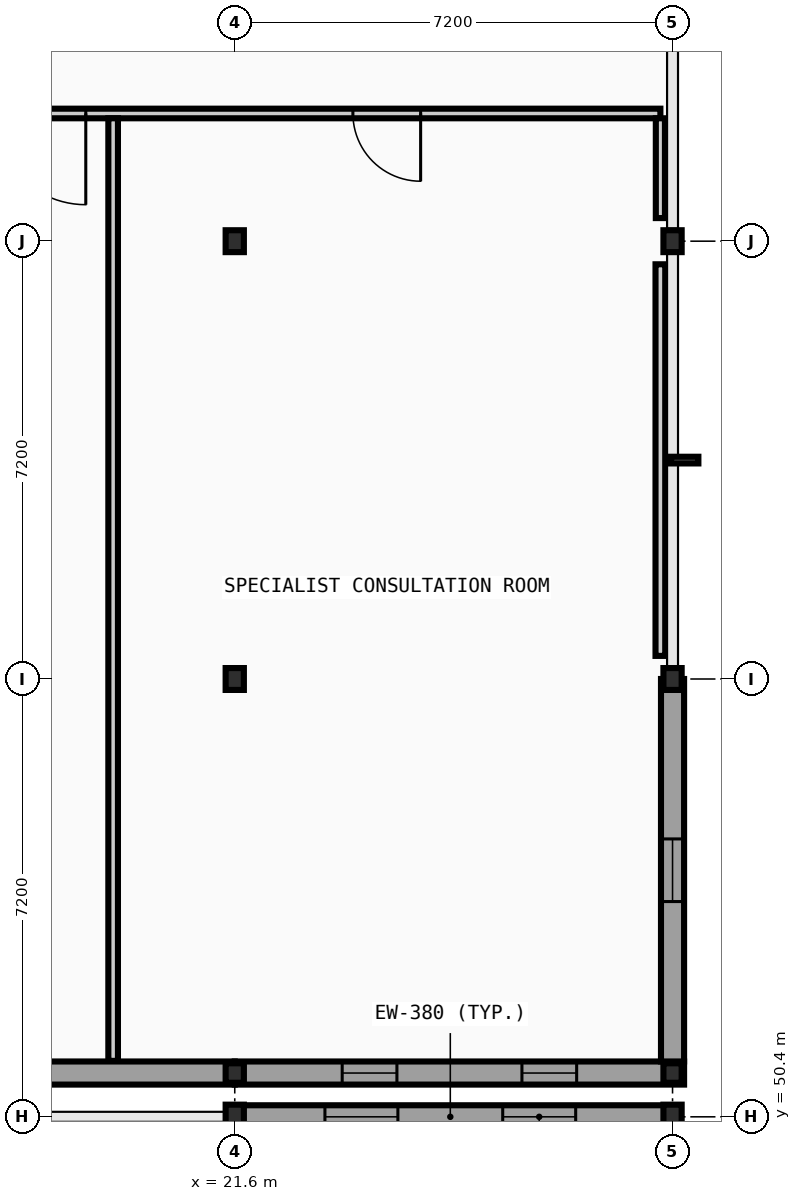
"""IFC4 building model, lengths in metres.
Left out: names, types, materials, properties, quantities, classifications, styles, units other than length and angle.
Written with IfcOpenShell. Run it as: python <this file> out.ifc"""

import sys

from ifc_helpers import new_model, si_unit, direction, frame, frame_2d, origin, origin_2d, place, context, subcontext, project, spatial, rectangle, i_section, extrude, element, fill, save


model = new_model("IFC4")
c1 = context("Model", 3, precision=1e-05, world=origin(), true_north=direction((0.0, 1.0)))
c2 = subcontext(c1, "Body", "Model", "MODEL_VIEW")
j1 = project(units=[si_unit("LENGTHUNIT", "METRE"), si_unit("PLANEANGLEUNIT", "RADIAN")], contexts=[c1])
p1 = place(None, origin())
s1 = spatial("IfcSite", under=j1, at=p1, CompositionType="ELEMENT")
p2 = place(p1, origin())
s2 = spatial("IfcBuilding", under=s1, at=p2, CompositionType="ELEMENT")
p3 = place(p2, frame((0.0, 0.0, 5.2)))
s3 = spatial("IfcBuildingStorey", under=s2, at=p3, CompositionType="ELEMENT", Elevation=5.2)
p4 = place(p3, frame((21.6, 50.4, 0.0), z_axis=(0.0, 0.0, 1.0), x_axis=(1.0, 0.0, 0.0)))
e1 = element("IfcColumn", 1, at=p4, inside=s3, PredefinedType="COLUMN", context=c2, shape_type="SweptSolid", body=[
    extrude(i_section(OverallWidth=0.3, OverallDepth=0.4, WebThickness=0.013, FlangeThickness=0.024, FilletRadius=0.027, at=origin_2d()), origin(), (0.0, 0.0, 1.0), 4.4),
])
p5 = place(p3, frame((21.6, 51.12, 0.0), z_axis=(0.0, 0.0, 1.0), x_axis=(1.0, 0.0, 0.0)))
e2 = element("IfcColumn", 2, at=p5, inside=s3, PredefinedType="COLUMN", context=c2, shape_type="SweptSolid", body=[
    extrude(i_section(OverallWidth=0.3, OverallDepth=0.32, WebThickness=0.011, FlangeThickness=0.021, FilletRadius=0.027, at=origin_2d()), origin(), (0.0, 0.0, 1.0), 4.4),
])
for number, where, z_axis, x_axis in (
    (3, (21.6, 57.6, 0.0), (0.0, 0.0, 1.0), (1.0, 0.0, 0.0)),
    (4, (21.6, 64.8, 0.0), (0.0, 0.0, 1.0), (1.0, 0.0, 0.0)),
):
    element("IfcColumn", number, at=place(p3, frame(where, z_axis=z_axis, x_axis=x_axis)), inside=s3, PredefinedType="COLUMN", context=c2, shape_type="SweptSolid", body=[
        extrude(i_section(OverallWidth=0.3, OverallDepth=0.36, WebThickness=0.012, FlangeThickness=0.022, FilletRadius=0.027, at=origin_2d()), origin(), (0.0, 0.0, 1.0), 4.4),
    ])
p6 = place(p3, frame((28.8, 50.4, 0.0), z_axis=(0.0, 0.0, 1.0), x_axis=(1.0, 0.0, 0.0)))
e5 = element("IfcColumn", 5, at=p6, inside=s3, PredefinedType="COLUMN", context=c2, shape_type="SweptSolid", body=[
    extrude(i_section(OverallWidth=0.3, OverallDepth=0.4, WebThickness=0.013, FlangeThickness=0.024, FilletRadius=0.027, at=origin_2d()), origin(), (0.0, 0.0, 1.0), 4.4),
])
p7 = place(p3, frame((28.8, 51.12, 0.0), z_axis=(0.0, 0.0, 1.0), x_axis=(1.0, 0.0, 0.0)))
e6 = element("IfcColumn", 6, at=p7, inside=s3, PredefinedType="COLUMN", context=c2, shape_type="SweptSolid", body=[
    extrude(i_section(OverallWidth=0.3, OverallDepth=0.32, WebThickness=0.011, FlangeThickness=0.021, FilletRadius=0.027, at=origin_2d()), origin(), (0.0, 0.0, 1.0), 4.4),
])
for number, where, z_axis, x_axis in (
    (7, (28.8, 57.6, 0.0), (0.0, 0.0, 1.0), (1.0, 0.0, 0.0)),
    (8, (28.8, 64.8, 0.0), (0.0, 0.0, 1.0), (1.0, 0.0, 0.0)),
):
    element("IfcColumn", number, at=place(p3, frame(where, z_axis=z_axis, x_axis=x_axis)), inside=s3, PredefinedType="COLUMN", context=c2, shape_type="SweptSolid", body=[
        extrude(i_section(OverallWidth=0.3, OverallDepth=0.36, WebThickness=0.012, FlangeThickness=0.022, FilletRadius=0.027, at=origin_2d()), origin(), (0.0, 0.0, 1.0), 4.4),
    ])
p8 = place(p3, frame((28.8, 50.4, 0.0), z_axis=(0.0, 0.0, 1.0), x_axis=(-1.0, 0.0, 0.0)))
e9 = element("IfcWall", 9, at=p8, inside=s3, PredefinedType="STANDARD", context=c2, shape_type="SweptSolid", body=[
    extrude(rectangle(XDim=7.31, YDim=0.38, at=frame_2d((3.655, 0.0))), origin(), (0.0, 0.0, 1.0), 3.88),
])
p9 = place(p8, frame((1.593, 0.0, 0.95)))
e10 = element("IfcOpeningElement", 10, at=p9, cuts=e9, PredefinedType="OPENING", context=c2, shape_type="SweptSolid", body=[
    extrude(rectangle(XDim=1.2, YDim=1.26, at=frame_2d((0.6, 0.63))), frame((0.0, 0.2, 0.0), z_axis=(0.0, -1.0, 0.0), x_axis=(1.0, 0.0, 0.0)), (0.0, 0.0, 1.0), 0.4),
])
p10 = place(p8, frame((4.517, 0.0, 0.95)))
e11 = element("IfcOpeningElement", 11, at=p10, cuts=e9, PredefinedType="OPENING", context=c2, shape_type="SweptSolid", body=[
    extrude(rectangle(XDim=1.2, YDim=1.26, at=frame_2d((0.6, 0.63))), frame((0.0, 0.2, 0.0), z_axis=(0.0, -1.0, 0.0), x_axis=(1.0, 0.0, 0.0)), (0.0, 0.0, 1.0), 0.4),
])
p11 = place(p3, frame((14.4, 51.12, 0.0), z_axis=(0.0, 0.0, 1.0), x_axis=(1.0, 0.0, 0.0)))
e12 = element("IfcWall", 12, at=p11, inside=s3, PredefinedType="STANDARD", context=c2, shape_type="SweptSolid", body=[
    extrude(rectangle(XDim=7.2, YDim=0.38, at=frame_2d((3.6, 0.0))), origin(), (0.0, 0.0, 1.0), 3.88),
])
p12 = place(p11, frame((1.56, 0.0, 0.9)))
e13 = element("IfcOpeningElement", 13, at=p12, cuts=e12, PredefinedType="OPENING", context=c2, shape_type="SweptSolid", body=[
    extrude(rectangle(XDim=1.2, YDim=1.8, at=frame_2d((0.6, 0.9))), frame((0.0, 0.2, 0.0), z_axis=(0.0, -1.0, 0.0), x_axis=(1.0, 0.0, 0.0)), (0.0, 0.0, 1.0), 0.4),
])
p13 = place(p3, frame((21.6, 51.12, 0.0), z_axis=(0.0, 0.0, 1.0), x_axis=(1.0, 0.0, 0.0)))
e14 = element("IfcWall", 14, at=p13, inside=s3, PredefinedType="STANDARD", context=c2, shape_type="SweptSolid", body=[
    extrude(rectangle(XDim=7.39, YDim=0.38, at=frame_2d((3.695, 0.0))), origin(), (0.0, 0.0, 1.0), 3.88),
])
p14 = place(p13, frame((1.767, 0.0, 1.1)))
e15 = element("IfcOpeningElement", 15, at=p14, cuts=e14, PredefinedType="OPENING", context=c2, shape_type="SweptSolid", body=[
    extrude(rectangle(XDim=0.9, YDim=1.6, at=frame_2d((0.45, 0.8))), frame((0.0, 0.2, 0.0), z_axis=(0.0, -1.0, 0.0), x_axis=(1.0, 0.0, 0.0)), (0.0, 0.0, 1.0), 0.4),
])
p15 = place(p13, frame((4.723, 0.0, 1.1)))
e16 = element("IfcOpeningElement", 16, at=p15, cuts=e14, PredefinedType="OPENING", context=c2, shape_type="SweptSolid", body=[
    extrude(rectangle(XDim=0.9, YDim=1.6, at=frame_2d((0.45, 0.8))), frame((0.0, 0.2, 0.0), z_axis=(0.0, -1.0, 0.0), x_axis=(1.0, 0.0, 0.0)), (0.0, 0.0, 1.0), 0.4),
])
p16 = place(p3, frame((28.8, 51.31, 0.0), z_axis=(0.0, 0.0, 1.0), x_axis=(0.0, 1.0, 0.0)))
e17 = element("IfcWall", 17, at=p16, inside=s3, PredefinedType="STANDARD", context=c2, shape_type="SweptSolid", body=[
    extrude(rectangle(XDim=6.29, YDim=0.38, at=frame_2d((3.145, 0.0))), origin(), (0.0, 0.0, 1.0), 3.81),
])
p17 = place(p16, frame((2.63, 0.0, 0.95)))
e18 = element("IfcOpeningElement", 18, at=p17, cuts=e17, PredefinedType="OPENING", context=c2, shape_type="SweptSolid", body=[
    extrude(rectangle(XDim=1.03, YDim=1.26, at=frame_2d((0.515, 0.63))), frame((0.0, 0.2, 0.0), z_axis=(0.0, -1.0, 0.0), x_axis=(1.0, 0.0, 0.0)), (0.0, 0.0, 1.0), 0.4),
])
p18 = place(p3, frame((14.7, 66.9, 0.0), z_axis=(0.0, 0.0, 1.0), x_axis=(1.0, 0.0, 0.0)))
e19 = element("IfcWall", 19, at=p18, inside=s3, PredefinedType="PARTITIONING", context=c2, shape_type="SweptSolid", body=[
    extrude(rectangle(XDim=13.9, YDim=0.158, at=frame_2d((6.95, 0.0))), origin(), (0.0, 0.0, 1.0), 4.185),
])
p19 = place(p18, frame((2.95, 0.0, 0.0)))
e20 = element("IfcOpeningElement", 20, at=p19, cuts=e19, PredefinedType="OPENING", context=c2, shape_type="SweptSolid", body=[
    extrude(rectangle(XDim=1.5, YDim=2.2, at=frame_2d((0.75, 1.1))), frame((0.0, 0.089, 0.0), z_axis=(0.0, -1.0, 0.0), x_axis=(1.0, 0.0, 0.0)), (0.0, 0.0, 1.0), 0.178),
])
p20 = place(p18, frame((8.843, 0.0, 0.0)))
e21 = element("IfcOpeningElement", 21, at=p20, cuts=e19, PredefinedType="OPENING", context=c2, shape_type="SweptSolid", body=[
    extrude(rectangle(XDim=1.114, YDim=2.124, at=frame_2d((0.557, 1.062))), frame((0.0, 0.089, 0.0), z_axis=(0.0, -1.0, 0.0), x_axis=(1.0, 0.0, 0.0)), (0.0, 0.0, 1.0), 0.178),
])
p21 = place(p3, frame((19.6, 51.32, 0.0), z_axis=(0.0, 0.0, 1.0), x_axis=(0.0, 1.0, 0.0)))
e22 = element("IfcWall", 22, at=p21, inside=s3, PredefinedType="PARTITIONING", context=c2, shape_type="SweptSolid", body=[
    extrude(rectangle(XDim=15.501, YDim=0.158, at=frame_2d((7.75, 0.0))), origin(), (0.0, 0.0, 1.0), 4.185),
])
p22 = place(p3, frame((28.6, 57.98, 0.0), z_axis=(0.0, 0.0, 1.0), x_axis=(0.0, 1.0, 0.0)))
e23 = element("IfcWall", 23, at=p22, inside=s3, PredefinedType="PARTITIONING", context=c2, shape_type="SweptSolid", body=[
    extrude(rectangle(XDim=6.44, YDim=0.16, at=frame_2d((3.22, 0.0))), origin(), (0.0, 0.0, 1.0), 3.81),
])
p23 = place(p3, frame((28.6, 65.18, 0.0), z_axis=(0.0, 0.0, 1.0), x_axis=(0.0, 1.0, 0.0)))
e24 = element("IfcWall", 24, at=p23, inside=s3, PredefinedType="PARTITIONING", context=c2, shape_type="SweptSolid", body=[
    extrude(rectangle(XDim=1.641, YDim=0.15, at=frame_2d((0.821, 0.0))), origin(), (0.0, 0.0, 1.0), 3.81),
])
p24 = place(p9, origin())
e25 = element("IfcWindow", 25, at=p24, inside=s3, PartitioningType="SINGLE_PANEL", PredefinedType="WINDOW", context=c2, shape_type="SweptSolid", body=[
    extrude(rectangle(XDim=1.2, YDim=1.26, at=frame_2d((0.6, 0.63))), frame((0.0, 0.03, 0.0), z_axis=(0.0, -1.0, 0.0), x_axis=(1.0, 0.0, 0.0)), (0.0, 0.0, 1.0), 0.06),
])
fill(e10, e25)
p25 = place(p10, origin())
e26 = element("IfcWindow", 26, at=p25, inside=s3, PartitioningType="SINGLE_PANEL", PredefinedType="WINDOW", context=c2, shape_type="SweptSolid", body=[
    extrude(rectangle(XDim=1.2, YDim=1.26, at=frame_2d((0.6, 0.63))), frame((0.0, 0.03, 0.0), z_axis=(0.0, -1.0, 0.0), x_axis=(1.0, 0.0, 0.0)), (0.0, 0.0, 1.0), 0.06),
])
fill(e11, e26)
p26 = place(p14, origin())
e27 = element("IfcWindow", 27, at=p26, inside=s3, PartitioningType="SINGLE_PANEL", PredefinedType="WINDOW", context=c2, shape_type="SweptSolid", body=[
    extrude(rectangle(XDim=0.9, YDim=1.6, at=frame_2d((0.45, 0.8))), frame((0.0, 0.03, 0.0), z_axis=(0.0, -1.0, 0.0), x_axis=(1.0, 0.0, 0.0)), (0.0, 0.0, 1.0), 0.06),
])
fill(e15, e27)
p27 = place(p15, origin())
e28 = element("IfcWindow", 28, at=p27, inside=s3, PartitioningType="SINGLE_PANEL", PredefinedType="WINDOW", context=c2, shape_type="SweptSolid", body=[
    extrude(rectangle(XDim=0.9, YDim=1.6, at=frame_2d((0.45, 0.8))), frame((0.0, 0.03, 0.0), z_axis=(0.0, -1.0, 0.0), x_axis=(1.0, 0.0, 0.0)), (0.0, 0.0, 1.0), 0.06),
])
fill(e16, e28)
p28 = place(p17, origin())
e29 = element("IfcWindow", 29, at=p28, inside=s3, PartitioningType="SINGLE_PANEL", PredefinedType="WINDOW", context=c2, shape_type="SweptSolid", body=[
    extrude(rectangle(XDim=1.03, YDim=1.26, at=frame_2d((0.515, 0.63))), frame((0.0, 0.03, 0.0), z_axis=(0.0, -1.0, 0.0), x_axis=(1.0, 0.0, 0.0)), (0.0, 0.0, 1.0), 0.06),
])
fill(e18, e29)
p29 = place(p19, origin())
e30 = element("IfcDoor", 30, at=p29, inside=s3, OperationType="DOUBLE_DOOR_SINGLE_SWING", PredefinedType="DOOR", context=c2, shape_type="SweptSolid", body=[
    extrude(rectangle(XDim=1.5, YDim=2.2, at=frame_2d((0.75, 1.1))), frame((0.0, 0.025, 0.0), z_axis=(0.0, -1.0, 0.0), x_axis=(1.0, 0.0, 0.0)), (0.0, 0.0, 1.0), 0.05),
])
fill(e20, e30)
p30 = place(p20, origin())
e31 = element("IfcDoor", 31, at=p30, inside=s3, OperationType="SINGLE_SWING_RIGHT", PredefinedType="DOOR", context=c2, shape_type="SweptSolid", body=[
    extrude(rectangle(XDim=1.114, YDim=2.124, at=frame_2d((0.557, 1.062))), frame((0.0, 0.025, 0.0), z_axis=(0.0, -1.0, 0.0), x_axis=(1.0, 0.0, 0.0)), (0.0, 0.0, 1.0), 0.05),
])
fill(e21, e31)
save(model, sys.argv[1])
